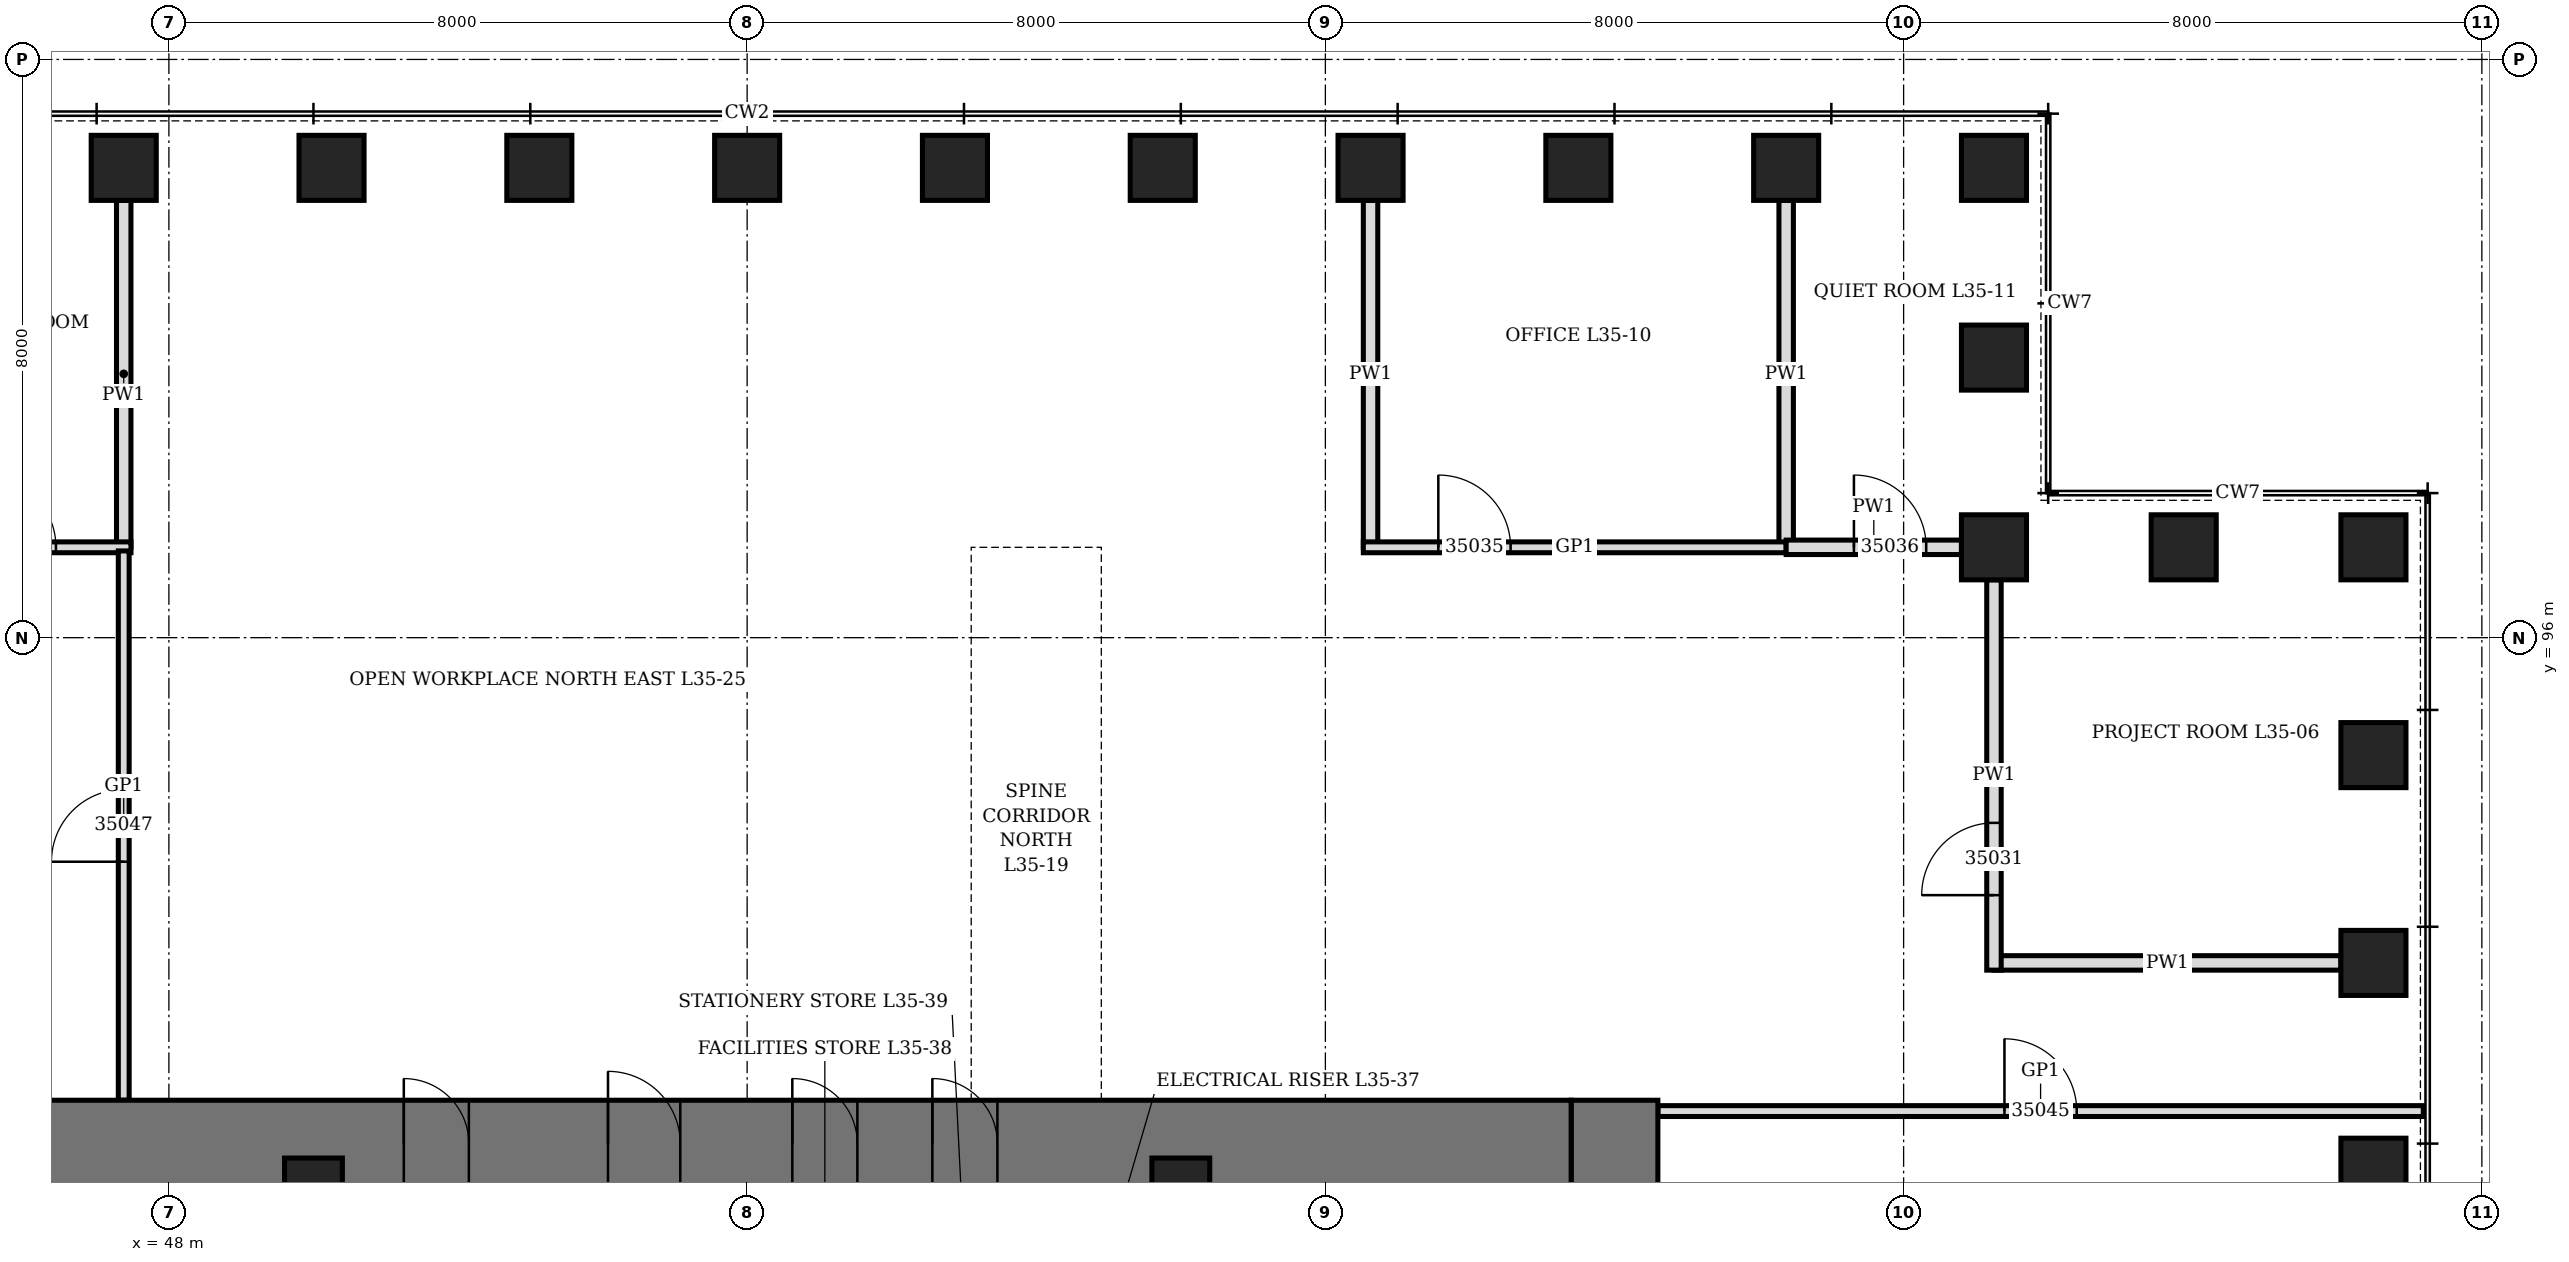
"""IFC4 building model, lengths in metres.
Left out: names, types, materials, properties, quantities, classifications, styles, units other than length and angle.
Written with IfcOpenShell. Run it as: python <this file> out.ifc"""

import sys

from ifc_helpers import new_model, si_unit, direction, frame, frame_2d, origin, origin_2d, place, context, subcontext, project, spatial, rectangle, hollow_rectangle, extrude, element, fill, save


model = new_model("IFC4")
c1 = context("Model", 3, precision=1e-05, world=origin(), true_north=direction((0.0, 1.0)))
c2 = subcontext(c1, "Body", "Model", "MODEL_VIEW")
j1 = project(units=[si_unit("LENGTHUNIT", "METRE"), si_unit("PLANEANGLEUNIT", "RADIAN")], contexts=[c1])
p1 = place(None, origin())
s1 = spatial("IfcSite", under=j1, at=p1, CompositionType="ELEMENT")
p2 = place(p1, origin())
s2 = spatial("IfcBuilding", under=s1, at=p2, CompositionType="ELEMENT")
p3 = place(p2, frame((0.0, 0.0, 158.5)))
s3 = spatial("IfcBuildingStorey", under=s2, at=p3, CompositionType="ELEMENT", Elevation=158.5)
for number, where, z_axis, x_axis in (
    (1, (78.5, 88.625, 0.0), (0.0, 0.0, 1.0), (0.0, 1.0, 0.0)),
    (2, (78.5, 91.5, 0.0), (0.0, 0.0, 1.0), (0.0, 1.0, 0.0)),
    (3, (78.5, 94.375, 0.0), (0.0, 0.0, 1.0), (0.0, 1.0, 0.0)),
    (4, (78.5, 97.25, 0.0), (0.0, 0.0, 1.0), (1.0, 0.0, 0.0)),
    (5, (75.875, 97.25, 0.0), (0.0, 0.0, 1.0), (1.0, 0.0, 0.0)),
    (6, (73.25, 97.25, 0.0), (0.0, 0.0, 1.0), (0.0, 1.0, 0.0)),
    (7, (73.25, 99.875, 0.0), (0.0, 0.0, 1.0), (0.0, 1.0, 0.0)),
    (8, (73.25, 102.5, 0.0), (0.0, 0.0, 1.0), (1.0, 0.0, 0.0)),
    (9, (70.375, 102.5, 0.0), (0.0, 0.0, 1.0), (1.0, 0.0, 0.0)),
    (10, (67.5, 102.5, 0.0), (0.0, 0.0, 1.0), (1.0, 0.0, 0.0)),
    (11, (64.625, 102.5, 0.0), (0.0, 0.0, 1.0), (1.0, 0.0, 0.0)),
    (12, (61.75, 102.5, 0.0), (0.0, 0.0, 1.0), (1.0, 0.0, 0.0)),
    (13, (58.875, 102.5, 0.0), (0.0, 0.0, 1.0), (1.0, 0.0, 0.0)),
    (14, (56.0, 102.5, 0.0), (0.0, 0.0, 1.0), (1.0, 0.0, 0.0)),
    (15, (53.125, 102.5, 0.0), (0.0, 0.0, 1.0), (1.0, 0.0, 0.0)),
    (16, (50.25, 102.5, 0.0), (0.0, 0.0, 1.0), (1.0, 0.0, 0.0)),
    (17, (47.375, 102.5, 0.0), (0.0, 0.0, 1.0), (1.0, 0.0, 0.0)),
):
    element("IfcColumn", number, at=place(p3, frame(where, z_axis=z_axis, x_axis=x_axis)), inside=s3, PredefinedType="COLUMN", context=c2, shape_type="SweptSolid", body=[
        extrude(hollow_rectangle(XDim=0.9, YDim=0.9, WallThickness=0.12, at=origin_2d()), origin(), (0.0, 0.0, 1.0), 4.2),
    ])
p4 = place(p3, frame((68.0, 70.4, 0.0), z_axis=(0.0, 0.0, 1.0), x_axis=(0.0, 1.0, 0.0)))
e18 = element("IfcWall", 18, at=p4, inside=s3, PredefinedType="SHEAR", context=c2, shape_type="SweptSolid", body=[
    extrude(rectangle(XDim=19.2, YDim=1.2, at=frame_2d((9.6, 0.0))), origin(), (0.0, 0.0, 1.0), 4.2),
])
p5 = place(p4, frame((8.6, 0.0, 0.0)))
e19 = element("IfcOpeningElement", 19, at=p5, cuts=e18, PredefinedType="OPENING", context=c2, shape_type="SweptSolid", body=[
    extrude(rectangle(XDim=2.0, YDim=2.4, at=frame_2d((1.0, 1.2))), frame((0.0, 0.61, 0.0), z_axis=(0.0, -1.0, 0.0), x_axis=(1.0, 0.0, 0.0)), (0.0, 0.0, 1.0), 1.22),
])
p6 = place(p3, frame((44.6, 89.0, 0.0), z_axis=(0.0, 0.0, 1.0), x_axis=(1.0, 0.0, 0.0)))
e20 = element("IfcWall", 20, at=p6, inside=s3, PredefinedType="SHEAR", context=c2, shape_type="SweptSolid", body=[
    extrude(rectangle(XDim=22.8, YDim=1.2, at=frame_2d((11.4, 0.0))), origin(), (0.0, 0.0, 1.0), 4.2),
])
p7 = place(p6, frame((9.475, 0.0, 0.0)))
e21 = element("IfcOpeningElement", 21, at=p7, cuts=e20, PredefinedType="OPENING", context=c2, shape_type="SweptSolid", body=[
    extrude(rectangle(XDim=1.0, YDim=2.1, at=frame_2d((0.5, 1.05))), frame((0.0, 0.61, 0.0), z_axis=(0.0, -1.0, 0.0), x_axis=(1.0, 0.0, 0.0)), (0.0, 0.0, 1.0), 1.22),
])
p8 = place(p6, frame((6.65, 0.0, 0.0)))
e22 = element("IfcOpeningElement", 22, at=p8, cuts=e20, PredefinedType="OPENING", context=c2, shape_type="SweptSolid", body=[
    extrude(rectangle(XDim=0.9, YDim=2.1, at=frame_2d((0.45, 1.05))), frame((0.0, 0.61, 0.0), z_axis=(0.0, -1.0, 0.0), x_axis=(1.0, 0.0, 0.0)), (0.0, 0.0, 1.0), 1.22),
])
p9 = place(p6, frame((12.025, 0.0, 0.0)))
e23 = element("IfcOpeningElement", 23, at=p9, cuts=e20, PredefinedType="OPENING", context=c2, shape_type="SweptSolid", body=[
    extrude(rectangle(XDim=0.9, YDim=2.1, at=frame_2d((0.45, 1.05))), frame((0.0, 0.61, 0.0), z_axis=(0.0, -1.0, 0.0), x_axis=(1.0, 0.0, 0.0)), (0.0, 0.0, 1.0), 1.22),
])
p10 = place(p6, frame((13.962, 0.0, 0.0)))
e24 = element("IfcOpeningElement", 24, at=p10, cuts=e20, PredefinedType="OPENING", context=c2, shape_type="SweptSolid", body=[
    extrude(rectangle(XDim=0.9, YDim=2.1, at=frame_2d((0.45, 1.05))), frame((0.0, 0.61, 0.0), z_axis=(0.0, -1.0, 0.0), x_axis=(1.0, 0.0, 0.0)), (0.0, 0.0, 1.0), 1.22),
])
for number, where, z_axis, x_axis in (
    (25, (50.0, 88.4, 0.0), (0.0, 0.0, 1.0), (1.0, 0.0, 0.0)),
    (26, (62.0, 88.4, 0.0), (0.0, 0.0, 1.0), (1.0, 0.0, 0.0)),
):
    element("IfcColumn", number, at=place(p3, frame(where, z_axis=z_axis, x_axis=x_axis)), inside=s3, PredefinedType="COLUMN", context=c2, shape_type="SweptSolid", body=[
        extrude(hollow_rectangle(XDim=0.8, YDim=0.8, WallThickness=0.1, at=origin_2d()), origin(), (0.0, 0.0, 1.0), 4.2),
    ])
p11 = place(p3, frame((73.25, 91.5, 0.0), z_axis=(0.0, 0.0, 1.0), x_axis=(1.0, 0.0, 0.0)))
e27 = element("IfcWall", 27, at=p11, inside=s3, PredefinedType="PARTITIONING", context=c2, shape_type="SweptSolid", body=[
    extrude(rectangle(XDim=4.8, YDim=0.2, at=frame_2d((2.4, 0.0))), origin(), (0.0, 0.0, 1.0), 3.428),
])
for number, where, z_axis, x_axis in (
    (28, (47.375, 97.25, 0.0), (0.0, 0.0, 1.0), (0.0, 1.0, 0.0)),
    (29, (64.625, 97.25, 0.0), (0.0, 0.0, 1.0), (0.0, 1.0, 0.0)),
):
    element("IfcWall", number, at=place(p3, frame(where, z_axis=z_axis, x_axis=x_axis)), inside=s3, PredefinedType="PARTITIONING", context=c2, shape_type="SweptSolid", body=[
        extrude(rectangle(XDim=4.8, YDim=0.2, at=frame_2d((2.4, 0.0))), origin(), (0.0, 0.0, 1.0), 3.278),
    ])
p12 = place(p3, frame((70.375, 97.25, 0.0), z_axis=(0.0, 0.0, 1.0), x_axis=(0.0, 1.0, 0.0)))
e30 = element("IfcWall", 30, at=p12, inside=s3, PredefinedType="PARTITIONING", context=c2, shape_type="SweptSolid", body=[
    extrude(rectangle(XDim=4.8, YDim=0.2, at=frame_2d((2.4, 0.0))), origin(), (0.0, 0.0, 1.0), 3.428),
])
p13 = place(p3, frame((68.6, 89.45, 0.0), z_axis=(0.0, 0.0, 1.0), x_axis=(1.0, 0.0, 0.0)))
e31 = element("IfcWall", 31, at=p13, inside=s3, PredefinedType="PARTITIONING", context=c2, shape_type="SweptSolid", body=[
    extrude(rectangle(XDim=10.59, YDim=0.15, at=frame_2d((5.295, 0.0))), origin(), (0.0, 0.0, 1.0), 4.04),
])
p14 = place(p13, frame((4.795, 0.0, 0.0)))
e32 = element("IfcOpeningElement", 32, at=p14, cuts=e31, PredefinedType="OPENING", context=c2, shape_type="SweptSolid", body=[
    extrude(rectangle(XDim=1.0, YDim=2.4, at=frame_2d((0.5, 1.2))), frame((0.0, 0.085, 0.0), z_axis=(0.0, -1.0, 0.0), x_axis=(1.0, 0.0, 0.0)), (0.0, 0.0, 1.0), 0.17),
])
p15 = place(p3, frame((44.5, 97.25, 0.0), z_axis=(0.0, 0.0, 1.0), x_axis=(1.0, 0.0, 0.0)))
e33 = element("IfcWall", 33, at=p15, inside=s3, PredefinedType="PARTITIONING", context=c2, shape_type="SweptSolid", body=[
    extrude(rectangle(XDim=2.975, YDim=0.15, at=frame_2d((1.488, 0.0))), origin(), (0.0, 0.0, 1.0), 4.04),
])
p16 = place(p15, frame((0.938, 0.0, 0.0)))
e34 = element("IfcOpeningElement", 34, at=p16, cuts=e33, PredefinedType="OPENING", context=c2, shape_type="SweptSolid", body=[
    extrude(rectangle(XDim=1.0, YDim=2.4, at=frame_2d((0.5, 1.2))), frame((0.0, 0.085, 0.0), z_axis=(0.0, -1.0, 0.0), x_axis=(1.0, 0.0, 0.0)), (0.0, 0.0, 1.0), 0.17),
])
p17 = place(p3, frame((64.525, 97.25, 0.0), z_axis=(0.0, 0.0, 1.0), x_axis=(1.0, 0.0, 0.0)))
e35 = element("IfcWall", 35, at=p17, inside=s3, PredefinedType="PARTITIONING", context=c2, shape_type="SweptSolid", body=[
    extrude(rectangle(XDim=5.85, YDim=0.15, at=frame_2d((2.925, 0.0))), origin(), (0.0, 0.0, 1.0), 4.04),
])
p18 = place(p17, frame((1.038, 0.0, 0.0)))
e36 = element("IfcOpeningElement", 36, at=p18, cuts=e35, PredefinedType="OPENING", context=c2, shape_type="SweptSolid", body=[
    extrude(rectangle(XDim=1.0, YDim=2.1, at=frame_2d((0.5, 1.05))), frame((0.0, 0.085, 0.0), z_axis=(0.0, -1.0, 0.0), x_axis=(1.0, 0.0, 0.0)), (0.0, 0.0, 1.0), 0.17),
])
p19 = place(p3, frame((70.375, 97.25, 0.0), z_axis=(0.0, 0.0, 1.0), x_axis=(1.0, 0.0, 0.0)))
e37 = element("IfcWall", 37, at=p19, inside=s3, PredefinedType="PARTITIONING", context=c2, shape_type="SweptSolid", body=[
    extrude(rectangle(XDim=2.425, YDim=0.2, at=frame_2d((1.212, 0.0))), origin(), (0.0, 0.0, 1.0), 4.04),
])
p20 = place(p19, frame((0.938, 0.0, 0.0)))
e38 = element("IfcOpeningElement", 38, at=p20, cuts=e37, PredefinedType="OPENING", context=c2, shape_type="SweptSolid", body=[
    extrude(rectangle(XDim=1.0, YDim=2.1, at=frame_2d((0.5, 1.05))), frame((0.0, 0.11, 0.0), z_axis=(0.0, -1.0, 0.0), x_axis=(1.0, 0.0, 0.0)), (0.0, 0.0, 1.0), 0.22),
])
p21 = place(p3, frame((47.375, 89.6, 0.0), z_axis=(0.0, 0.0, 1.0), x_axis=(0.0, 1.0, 0.0)))
e39 = element("IfcWall", 39, at=p21, inside=s3, PredefinedType="PARTITIONING", context=c2, shape_type="SweptSolid", body=[
    extrude(rectangle(XDim=7.6, YDim=0.15, at=frame_2d((3.8, 0.0))), origin(), (0.0, 0.0, 1.0), 3.278),
])
p22 = place(p21, frame((3.3, 0.0, 0.0)))
e40 = element("IfcOpeningElement", 40, at=p22, cuts=e39, PredefinedType="OPENING", context=c2, shape_type="SweptSolid", body=[
    extrude(rectangle(XDim=1.0, YDim=2.4, at=frame_2d((0.5, 1.2))), frame((0.0, 0.085, 0.0), z_axis=(0.0, -1.0, 0.0), x_axis=(1.0, 0.0, 0.0)), (0.0, 0.0, 1.0), 0.17),
])
p23 = place(p3, frame((73.25, 91.4, 0.0), z_axis=(0.0, 0.0, 1.0), x_axis=(0.0, 1.0, 0.0)))
e41 = element("IfcWall", 41, at=p23, inside=s3, PredefinedType="PARTITIONING", context=c2, shape_type="SweptSolid", body=[
    extrude(rectangle(XDim=5.4, YDim=0.2, at=frame_2d((2.7, 0.0))), origin(), (0.0, 0.0, 1.0), 4.04),
])
p24 = place(p23, frame((1.038, 0.0, 0.0)))
e42 = element("IfcOpeningElement", 42, at=p24, cuts=e41, PredefinedType="OPENING", context=c2, shape_type="SweptSolid", body=[
    extrude(rectangle(XDim=1.0, YDim=2.1, at=frame_2d((0.5, 1.05))), frame((0.0, 0.11, 0.0), z_axis=(0.0, -1.0, 0.0), x_axis=(1.0, 0.0, 0.0)), (0.0, 0.0, 1.0), 0.22),
])
p25 = place(p7, origin())
e43 = element("IfcDoor", 43, at=p25, inside=s3, OperationType="SINGLE_SWING_LEFT", PredefinedType="DOOR", context=c2, shape_type="SweptSolid", body=[
    extrude(rectangle(XDim=1.0, YDim=2.1, at=frame_2d((0.5, 1.05))), frame((0.0, 0.35, 0.0), z_axis=(0.0, -1.0, 0.0), x_axis=(1.0, 0.0, 0.0)), (0.0, 0.0, 1.0), 0.7),
])
fill(e21, e43)
p26 = place(p8, origin())
e44 = element("IfcDoor", 44, at=p26, inside=s3, OperationType="SINGLE_SWING_LEFT", PredefinedType="DOOR", context=c2, shape_type="SweptSolid", body=[
    extrude(rectangle(XDim=0.9, YDim=2.1, at=frame_2d((0.45, 1.05))), frame((0.0, 0.35, 0.0), z_axis=(0.0, -1.0, 0.0), x_axis=(1.0, 0.0, 0.0)), (0.0, 0.0, 1.0), 0.7),
])
fill(e22, e44)
p27 = place(p9, origin())
e45 = element("IfcDoor", 45, at=p27, inside=s3, OperationType="SINGLE_SWING_LEFT", PredefinedType="DOOR", context=c2, shape_type="SweptSolid", body=[
    extrude(rectangle(XDim=0.9, YDim=2.1, at=frame_2d((0.45, 1.05))), frame((0.0, 0.35, 0.0), z_axis=(0.0, -1.0, 0.0), x_axis=(1.0, 0.0, 0.0)), (0.0, 0.0, 1.0), 0.7),
])
fill(e23, e45)
p28 = place(p10, origin())
e46 = element("IfcDoor", 46, at=p28, inside=s3, OperationType="SINGLE_SWING_LEFT", PredefinedType="DOOR", context=c2, shape_type="SweptSolid", body=[
    extrude(rectangle(XDim=0.9, YDim=2.1, at=frame_2d((0.45, 1.05))), frame((0.0, 0.35, 0.0), z_axis=(0.0, -1.0, 0.0), x_axis=(1.0, 0.0, 0.0)), (0.0, 0.0, 1.0), 0.7),
])
fill(e24, e46)
p29 = place(p24, origin())
e47 = element("IfcDoor", 47, at=p29, inside=s3, OperationType="SINGLE_SWING_LEFT", PredefinedType="DOOR", context=c2, shape_type="SweptSolid", body=[
    extrude(rectangle(XDim=1.0, YDim=2.1, at=frame_2d((0.5, 1.05))), frame((0.0, 0.1, 0.0), z_axis=(0.0, -1.0, 0.0), x_axis=(1.0, 0.0, 0.0)), (0.0, 0.0, 1.0), 0.199),
])
fill(e42, e47)
p30 = place(p16, origin())
e48 = element("IfcDoor", 48, at=p30, inside=s3, OperationType="SINGLE_SWING_RIGHT", PredefinedType="DOOR", context=c2, shape_type="SweptSolid", body=[
    extrude(rectangle(XDim=1.0, YDim=2.4, at=frame_2d((0.5, 1.2))), frame((0.0, 0.075, 0.0), z_axis=(0.0, -1.0, 0.0), x_axis=(1.0, 0.0, 0.0)), (0.0, 0.0, 1.0), 0.149),
])
fill(e34, e48)
p31 = place(p18, origin())
e49 = element("IfcDoor", 49, at=p31, inside=s3, OperationType="SINGLE_SWING_LEFT", PredefinedType="DOOR", context=c2, shape_type="SweptSolid", body=[
    extrude(rectangle(XDim=1.0, YDim=2.1, at=frame_2d((0.5, 1.05))), frame((0.0, 0.075, 0.0), z_axis=(0.0, -1.0, 0.0), x_axis=(1.0, 0.0, 0.0)), (0.0, 0.0, 1.0), 0.149),
])
fill(e36, e49)
p32 = place(p20, origin())
e50 = element("IfcDoor", 50, at=p32, inside=s3, OperationType="SINGLE_SWING_LEFT", PredefinedType="DOOR", context=c2, shape_type="SweptSolid", body=[
    extrude(rectangle(XDim=1.0, YDim=2.1, at=frame_2d((0.5, 1.05))), frame((0.0, 0.1, 0.0), z_axis=(0.0, -1.0, 0.0), x_axis=(1.0, 0.0, 0.0)), (0.0, 0.0, 1.0), 0.199),
])
fill(e38, e50)
p33 = place(p14, origin())
e51 = element("IfcDoor", 51, at=p33, inside=s3, OperationType="SINGLE_SWING_RIGHT", PredefinedType="DOOR", context=c2, shape_type="SweptSolid", body=[
    extrude(rectangle(XDim=1.0, YDim=2.4, at=frame_2d((0.5, 1.2))), frame((0.0, 0.075, 0.0), z_axis=(0.0, -1.0, 0.0), x_axis=(1.0, 0.0, 0.0)), (0.0, 0.0, 1.0), 0.149),
])
fill(e32, e51)
p34 = place(p22, origin())
e52 = element("IfcDoor", 52, at=p34, inside=s3, OperationType="SINGLE_SWING_RIGHT", PredefinedType="DOOR", context=c2, shape_type="SweptSolid", body=[
    extrude(rectangle(XDim=1.0, YDim=2.4, at=frame_2d((0.5, 1.2))), frame((0.0, 0.075, 0.0), z_axis=(0.0, -1.0, 0.0), x_axis=(1.0, 0.0, 0.0)), (0.0, 0.0, 1.0), 0.149),
])
fill(e40, e52)
save(model, sys.argv[1])
